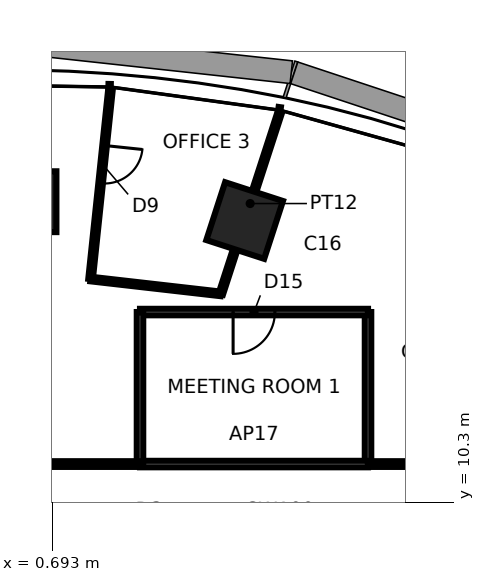
"""IFC4 building model, lengths in metres.
Left out: names, types, materials, properties, quantities, classifications, styles, units other than length and angle.
Written with IfcOpenShell. Run it as: python <this file> out.ifc"""

import sys

from ifc_helpers import new_model, si_unit, direction, frame, frame_2d, origin, origin_2d, place, context, subcontext, project, spatial, rectangle, extrude, element, fill, save


model = new_model("IFC4")
c1 = context("Model", 3, precision=1e-05, world=origin(), true_north=direction((0.0, 1.0)))
c2 = subcontext(c1, "Body", "Model", "MODEL_VIEW")
j1 = project(units=[si_unit("LENGTHUNIT", "METRE"), si_unit("PLANEANGLEUNIT", "RADIAN")], contexts=[c1])
p1 = place(None, origin())
s1 = spatial("IfcSite", under=j1, at=p1, CompositionType="ELEMENT")
p2 = place(p1, origin())
s2 = spatial("IfcBuilding", under=s1, at=p2, CompositionType="ELEMENT")
p3 = place(p2, frame((0.0, 0.0, 108.0)))
s3 = spatial("IfcBuildingStorey", under=s2, at=p3, CompositionType="ELEMENT", Elevation=108.0)
for number, where, z_axis, x_axis in (
    (1, (5.754, 17.708, 0.0), (0.0, 0.0, 1.0), (0.309, 0.951, 0.0)),
    (2, (0.0, 18.204, 0.0), (0.0, 0.0, 1.0), (0.0, 1.0, 0.0)),
):
    element("IfcColumn", number, at=place(p3, frame(where, z_axis=z_axis, x_axis=x_axis)), inside=s3, PredefinedType="COLUMN", context=c2, shape_type="SweptSolid", body=[
        extrude(rectangle(XDim=1.6, YDim=1.6, at=origin_2d()), origin(), (0.0, 0.0, 1.0), 3.9),
    ])
p4 = place(p3, frame((16.0, 11.3, 0.0), z_axis=(0.0, 0.0, 1.0), x_axis=(-1.0, 0.0, 0.0)))
e3 = element("IfcWall", 3, at=p4, inside=s3, PredefinedType="PARTITIONING", context=c2, shape_type="SweptSolid", body=[
    extrude(rectangle(XDim=7.0, YDim=0.15, at=frame_2d((3.5, 0.0))), origin(), (0.0, 0.0, 1.0), 3.74),
])
p5 = place(p3, frame((9.0, 11.3, 0.0), z_axis=(0.0, 0.0, 1.0), x_axis=(0.0, 1.0, 0.0)))
e4 = element("IfcWall", 4, at=p5, inside=s3, PredefinedType="PARTITIONING", context=c2, shape_type="SweptSolid", body=[
    extrude(rectangle(XDim=4.0, YDim=0.17, at=frame_2d((2.0, 0.0))), origin(), (0.0, 0.0, 1.0), 3.74),
])
p6 = place(p3, frame((3.0, 11.3, 0.0), z_axis=(0.0, 0.0, 1.0), x_axis=(1.0, 0.0, 0.0)))
e5 = element("IfcWall", 5, at=p6, inside=s3, PredefinedType="PARTITIONING", context=c2, shape_type="SweptSolid", body=[
    extrude(rectangle(XDim=6.0, YDim=0.17, at=frame_2d((3.0, 0.0))), origin(), (0.0, 0.0, 1.0), 3.74),
])
p7 = place(p3, frame((9.0, 15.3, 0.0), z_axis=(0.0, 0.0, 1.0), x_axis=(-1.0, 0.0, 0.0)))
e6 = element("IfcWall", 6, at=p7, inside=s3, PredefinedType="PARTITIONING", context=c2, shape_type="SweptSolid", body=[
    extrude(rectangle(XDim=6.0, YDim=0.17, at=frame_2d((3.0, 0.0))), origin(), (0.0, 0.0, 1.0), 3.74),
])
p8 = place(p7, frame((2.45, 0.0, 0.0)))
e7 = element("IfcOpeningElement", 7, at=p8, cuts=e6, PredefinedType="OPENING", context=c2, shape_type="SweptSolid", body=[
    extrude(rectangle(XDim=1.1, YDim=2.4, at=frame_2d((0.55, 1.2))), frame((0.0, 0.095, 0.0), z_axis=(0.0, -1.0, 0.0), x_axis=(1.0, 0.0, 0.0)), (0.0, 0.0, 1.0), 0.19),
])
p9 = place(p3, frame((5.126, 15.778, 0.0), z_axis=(0.0, 0.0, 1.0), x_axis=(0.309026452484, 0.951053443117, 0.0)))
e8 = element("IfcWall", 8, at=p9, inside=s3, PredefinedType="PARTITIONING", context=c2, shape_type="SweptSolid", body=[
    extrude(rectangle(XDim=5.0, YDim=0.12, at=frame_2d((2.5, 0.0))), origin(), (0.0, 0.0, 1.0), 2.94),
])
p10 = place(p3, frame((3.0, 15.3, 0.0), z_axis=(0.0, 0.0, 1.0), x_axis=(0.0, -1.0, 0.0)))
e9 = element("IfcWall", 9, at=p10, inside=s3, PredefinedType="PARTITIONING", context=c2, shape_type="SweptSolid", body=[
    extrude(rectangle(XDim=4.0, YDim=0.17, at=frame_2d((2.0, 0.0))), origin(), (0.0, 0.0, 1.0), 3.74),
])
p11 = place(p3, frame((1.699, 16.169, 0.0), z_axis=(0.0, 0.0, 1.0), x_axis=(0.993542478944, -0.113460753277, 0.0)))
e10 = element("IfcWall", 10, at=p11, inside=s3, PredefinedType="PARTITIONING", context=c2, shape_type="SweptSolid", body=[
    extrude(rectangle(XDim=3.449, YDim=0.12, at=frame_2d((1.725, 0.0))), origin(), (0.0, 0.0, 1.0), 3.74),
])
p12 = place(p3, frame((2.222, 21.142, 0.0), z_axis=(0.0, 0.0, 1.0), x_axis=(-0.104544982588, -0.994520158979, 0.0)))
e11 = element("IfcWall", 11, at=p12, inside=s3, PredefinedType="PARTITIONING", context=c2, shape_type="SweptSolid", body=[
    extrude(rectangle(XDim=5.0, YDim=0.12, at=frame_2d((2.5, 0.0))), origin(), (0.0, 0.0, 1.0), 3.74),
])
p13 = place(p12, frame((1.467, 0.0, 0.0)))
e12 = element("IfcOpeningElement", 12, at=p13, cuts=e11, PredefinedType="OPENING", context=c2, shape_type="SweptSolid", body=[
    extrude(rectangle(XDim=1.0, YDim=2.4, at=frame_2d((0.5, 1.2))), frame((0.0, 0.07, 0.0), z_axis=(0.0, -1.0, 0.0), x_axis=(1.0, 0.0, 0.0)), (0.0, 0.0, 1.0), 0.14),
])
p14 = place(p3, frame((3.0, 11.3, 0.0), z_axis=(0.0, 0.0, 1.0), x_axis=(-1.0, 0.0, 0.0)))
e13 = element("IfcWall", 13, at=p14, inside=s3, PredefinedType="PARTITIONING", context=c2, shape_type="SweptSolid", body=[
    extrude(rectangle(XDim=9.0, YDim=0.15, at=frame_2d((4.5, 0.0))), origin(), (0.0, 0.0, 1.0), 3.74),
])
p15 = place(p13, origin())
e14 = element("IfcDoor", 14, at=p15, inside=s3, OperationType="SINGLE_SWING_LEFT", PredefinedType="DOOR", context=c2, shape_type="SweptSolid", body=[
    extrude(rectangle(XDim=1.0, YDim=2.4, at=frame_2d((0.5, 1.2))), frame((0.0, 0.025, 0.0), z_axis=(0.0, -1.0, 0.0), x_axis=(1.0, 0.0, 0.0)), (0.0, 0.0, 1.0), 0.05),
])
fill(e12, e14)
p16 = place(p8, origin())
e15 = element("IfcDoor", 15, at=p16, inside=s3, OperationType="SINGLE_SWING_RIGHT", PredefinedType="DOOR", context=c2, shape_type="SweptSolid", body=[
    extrude(rectangle(XDim=1.1, YDim=2.4, at=frame_2d((0.55, 1.2))), frame((0.0, 0.025, 0.0), z_axis=(0.0, -1.0, 0.0), x_axis=(1.0, 0.0, 0.0)), (0.0, 0.0, 1.0), 0.05),
])
fill(e7, e15)
save(model, sys.argv[1])
